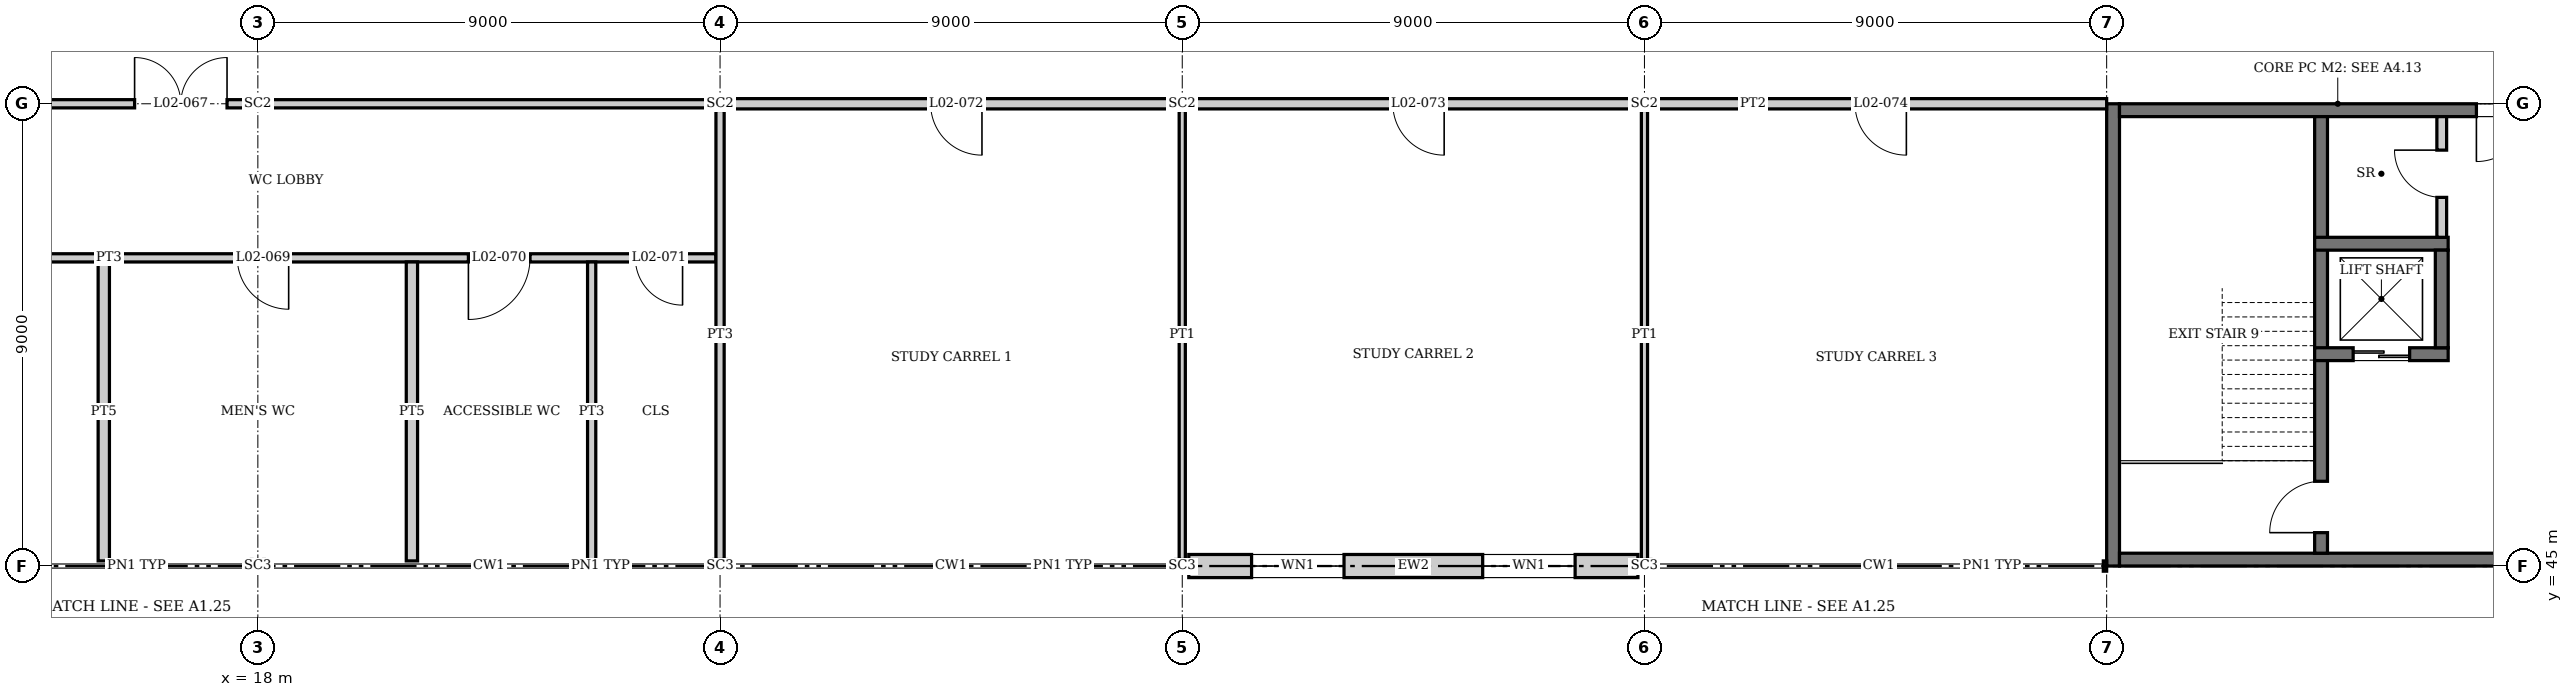
"""IFC4 building model, lengths in metres.
Left out: names, types, materials, properties, quantities, classifications, styles, units other than length and angle.
Written with IfcOpenShell. Run it as: python <this file> out.ifc"""

import sys

from ifc_helpers import new_model, si_unit, direction, frame, frame_2d, origin, origin_2d, place, context, subcontext, project, spatial, rectangle, i_section, extrude, element, fill, save


model = new_model("IFC4")
c1 = context("Model", 3, precision=1e-05, world=origin(), true_north=direction((0.0, 1.0)))
c2 = subcontext(c1, "Body", "Model", "MODEL_VIEW")
j1 = project(units=[si_unit("LENGTHUNIT", "METRE"), si_unit("PLANEANGLEUNIT", "RADIAN")], contexts=[c1])
p1 = place(None, origin())
s1 = spatial("IfcSite", under=j1, at=p1, CompositionType="ELEMENT")
p2 = place(p1, origin())
s2 = spatial("IfcBuilding", under=s1, at=p2, CompositionType="ELEMENT")
p3 = place(p2, frame((0.0, 0.0, 10.5)))
s3 = spatial("IfcBuildingStorey", under=s2, at=p3, CompositionType="ELEMENT", Elevation=10.5)
p4 = place(p3, frame((18.0, 45.0, 0.0), z_axis=(0.0, 0.0, 1.0), x_axis=(0.0, 1.0, 0.0)))
e1 = element("IfcColumn", 1, at=p4, inside=s3, PredefinedType="COLUMN", context=c2, shape_type="SweptSolid", body=[
    extrude(i_section(OverallWidth=0.254, OverallDepth=0.254, WebThickness=0.009, FlangeThickness=0.014, at=origin_2d()), origin(), (0.0, 0.0, 1.0), 4.5),
])
p5 = place(p3, frame((18.0, 54.0, 0.0), z_axis=(0.0, 0.0, 1.0), x_axis=(0.0, 1.0, 0.0)))
e2 = element("IfcColumn", 2, at=p5, inside=s3, PredefinedType="COLUMN", context=c2, shape_type="SweptSolid", body=[
    extrude(i_section(OverallWidth=0.256, OverallDepth=0.26, WebThickness=0.01, FlangeThickness=0.017, at=origin_2d()), origin(), (0.0, 0.0, 1.0), 4.5),
])
p6 = place(p3, frame((27.0, 45.0, 0.0), z_axis=(0.0, 0.0, 1.0), x_axis=(0.0, 1.0, 0.0)))
e3 = element("IfcColumn", 3, at=p6, inside=s3, PredefinedType="COLUMN", context=c2, shape_type="SweptSolid", body=[
    extrude(i_section(OverallWidth=0.254, OverallDepth=0.254, WebThickness=0.009, FlangeThickness=0.014, at=origin_2d()), origin(), (0.0, 0.0, 1.0), 4.5),
])
p7 = place(p3, frame((27.0, 54.0, 0.0), z_axis=(0.0, 0.0, 1.0), x_axis=(0.0, 1.0, 0.0)))
e4 = element("IfcColumn", 4, at=p7, inside=s3, PredefinedType="COLUMN", context=c2, shape_type="SweptSolid", body=[
    extrude(i_section(OverallWidth=0.256, OverallDepth=0.26, WebThickness=0.01, FlangeThickness=0.017, at=origin_2d()), origin(), (0.0, 0.0, 1.0), 4.5),
])
p8 = place(p3, frame((36.0, 45.0, 0.0), z_axis=(0.0, 0.0, 1.0), x_axis=(0.0, 1.0, 0.0)))
e5 = element("IfcColumn", 5, at=p8, inside=s3, PredefinedType="COLUMN", context=c2, shape_type="SweptSolid", body=[
    extrude(i_section(OverallWidth=0.254, OverallDepth=0.254, WebThickness=0.009, FlangeThickness=0.014, at=origin_2d()), origin(), (0.0, 0.0, 1.0), 4.5),
])
p9 = place(p3, frame((36.0, 54.0, 0.0), z_axis=(0.0, 0.0, 1.0), x_axis=(0.0, 1.0, 0.0)))
e6 = element("IfcColumn", 6, at=p9, inside=s3, PredefinedType="COLUMN", context=c2, shape_type="SweptSolid", body=[
    extrude(i_section(OverallWidth=0.256, OverallDepth=0.26, WebThickness=0.01, FlangeThickness=0.017, at=origin_2d()), origin(), (0.0, 0.0, 1.0), 4.5),
])
p10 = place(p3, frame((45.0, 45.0, 0.0), z_axis=(0.0, 0.0, 1.0), x_axis=(0.0, 1.0, 0.0)))
e7 = element("IfcColumn", 7, at=p10, inside=s3, PredefinedType="COLUMN", context=c2, shape_type="SweptSolid", body=[
    extrude(i_section(OverallWidth=0.254, OverallDepth=0.254, WebThickness=0.009, FlangeThickness=0.014, at=origin_2d()), origin(), (0.0, 0.0, 1.0), 4.5),
])
p11 = place(p3, frame((45.0, 54.0, 0.0), z_axis=(0.0, 0.0, 1.0), x_axis=(0.0, 1.0, 0.0)))
e8 = element("IfcColumn", 8, at=p11, inside=s3, PredefinedType="COLUMN", context=c2, shape_type="SweptSolid", body=[
    extrude(i_section(OverallWidth=0.256, OverallDepth=0.26, WebThickness=0.01, FlangeThickness=0.017, at=origin_2d()), origin(), (0.0, 0.0, 1.0), 4.5),
])
p12 = place(p3, frame((54.125, 45.0, 0.0), z_axis=(0.0, 0.0, 1.0), x_axis=(0.0, 1.0, 0.0)))
e9 = element("IfcWall", 9, at=p12, inside=s3, PredefinedType="SHEAR", context=c2, shape_type="SweptSolid", body=[
    extrude(rectangle(XDim=9.0, YDim=0.25, at=frame_2d((4.5, 0.0))), origin(), (0.0, 0.0, 1.0), 4.35),
])
p13 = place(p3, frame((54.25, 45.125, 0.0), z_axis=(0.0, 0.0, 1.0), x_axis=(1.0, 0.0, 0.0)))
e10 = element("IfcWall", 10, at=p13, inside=s3, PredefinedType="SHEAR", context=c2, shape_type="SweptSolid", body=[
    extrude(rectangle(XDim=8.5, YDim=0.25, at=frame_2d((4.25, 0.0))), origin(), (0.0, 0.0, 1.0), 4.35),
])
p14 = place(p3, frame((54.25, 53.875, 0.0), z_axis=(0.0, 0.0, 1.0), x_axis=(1.0, 0.0, 0.0)))
e11 = element("IfcWall", 11, at=p14, inside=s3, PredefinedType="SHEAR", context=c2, shape_type="SweptSolid", body=[
    extrude(rectangle(XDim=8.5, YDim=0.25, at=frame_2d((4.25, 0.0))), origin(), (0.0, 0.0, 1.0), 4.35),
])
p15 = place(p14, frame((6.95, 0.0, 0.0)))
e12 = element("IfcOpeningElement", 12, at=p15, cuts=e11, PredefinedType="OPENING", context=c2, shape_type="SweptSolid", body=[
    extrude(rectangle(XDim=1.0, YDim=2.1, at=frame_2d((0.5, 1.05))), frame((0.0, 0.135, 0.0), z_axis=(0.0, -1.0, 0.0), x_axis=(1.0, 0.0, 0.0)), (0.0, 0.0, 1.0), 0.27),
])
p16 = place(p3, frame((36.127, 45.0, 0.0), z_axis=(0.0, 0.0, 1.0), x_axis=(1.0, 0.0, 0.0)))
e13 = element("IfcWall", 13, at=p16, inside=s3, PredefinedType="SOLIDWALL", context=c2, shape_type="SweptSolid", body=[
    extrude(rectangle(XDim=8.746, YDim=0.45, at=frame_2d((4.373, 0.0))), origin(), (0.0, 0.0, 1.0), 3.991),
])
p17 = place(p16, frame((1.223, 0.0, 0.9)))
e14 = element("IfcOpeningElement", 14, at=p17, cuts=e13, PredefinedType="OPENING", context=c2, shape_type="SweptSolid", body=[
    extrude(rectangle(XDim=1.8, YDim=2.4, at=frame_2d((0.9, 1.2))), frame((0.0, 0.235, 0.0), z_axis=(0.0, -1.0, 0.0), x_axis=(1.0, 0.0, 0.0)), (0.0, 0.0, 1.0), 0.47),
])
p18 = place(p16, frame((5.723, 0.0, 0.9)))
e15 = element("IfcOpeningElement", 15, at=p18, cuts=e13, PredefinedType="OPENING", context=c2, shape_type="SweptSolid", body=[
    extrude(rectangle(XDim=1.8, YDim=2.4, at=frame_2d((0.9, 1.2))), frame((0.0, 0.235, 0.0), z_axis=(0.0, -1.0, 0.0), x_axis=(1.0, 0.0, 0.0)), (0.0, 0.0, 1.0), 0.47),
])
p19 = place(p3, frame((58.175, 45.25, 0.0), z_axis=(0.0, 0.0, 1.0), x_axis=(0.0, 1.0, 0.0)))
e16 = element("IfcWall", 16, at=p19, inside=s3, PredefinedType="SOLIDWALL", context=c2, shape_type="SweptSolid", body=[
    extrude(rectangle(XDim=8.5, YDim=0.25, at=frame_2d((4.25, 0.0))), origin(), (0.0, 0.0, 1.0), 4.35),
])
p20 = place(p19, frame((0.4, 0.0, 0.0)))
e17 = element("IfcOpeningElement", 17, at=p20, cuts=e16, PredefinedType="OPENING", context=c2, shape_type="SweptSolid", body=[
    extrude(rectangle(XDim=1.0, YDim=2.1, at=frame_2d((0.5, 1.05))), frame((0.0, 0.135, 0.0), z_axis=(0.0, -1.0, 0.0), x_axis=(1.0, 0.0, 0.0)), (0.0, 0.0, 1.0), 0.27),
])
p21 = place(p3, frame((58.05, 49.125, 0.0), z_axis=(0.0, 0.0, 1.0), x_axis=(1.0, 0.0, 0.0)))
e18 = element("IfcWall", 18, at=p21, inside=s3, PredefinedType="SOLIDWALL", context=c2, shape_type="SweptSolid", body=[
    extrude(rectangle(XDim=2.6, YDim=0.25, at=frame_2d((1.3, 0.0))), origin(), (0.0, 0.0, 1.0), 4.35),
])
p22 = place(p21, frame((0.75, 0.0, 0.0)))
e19 = element("IfcOpeningElement", 19, at=p22, cuts=e18, PredefinedType="OPENING", context=c2, shape_type="SweptSolid", body=[
    extrude(rectangle(XDim=1.1, YDim=2.1, at=frame_2d((0.55, 1.05))), frame((0.0, 0.135, 0.0), z_axis=(0.0, -1.0, 0.0), x_axis=(1.0, 0.0, 0.0)), (0.0, 0.0, 1.0), 0.27),
])
p23 = place(p3, frame((58.05, 51.275, 0.0), z_axis=(0.0, 0.0, 1.0), x_axis=(1.0, 0.0, 0.0)))
e20 = element("IfcWall", 20, at=p23, inside=s3, PredefinedType="SOLIDWALL", context=c2, shape_type="SweptSolid", body=[
    extrude(rectangle(XDim=2.6, YDim=0.25, at=frame_2d((1.3, 0.0))), origin(), (0.0, 0.0, 1.0), 4.35),
])
p24 = place(p3, frame((60.525, 49.25, 0.0), z_axis=(0.0, 0.0, 1.0), x_axis=(0.0, 1.0, 0.0)))
e21 = element("IfcWall", 21, at=p24, inside=s3, PredefinedType="SOLIDWALL", context=c2, shape_type="SweptSolid", body=[
    extrude(rectangle(XDim=1.9, YDim=0.25, at=frame_2d((0.95, 0.0))), origin(), (0.0, 0.0, 1.0), 4.35),
])
p25 = place(p3, frame((9.0, 51.0, 0.0), z_axis=(0.0, 0.0, 1.0), x_axis=(1.0, 0.0, 0.0)))
e22 = element("IfcWall", 22, at=p25, inside=s3, PredefinedType="PARTITIONING", context=c2, shape_type="SweptSolid", body=[
    extrude(rectangle(XDim=17.92, YDim=0.16, at=frame_2d((8.96, 0.0))), origin(), (0.0, 0.0, 1.0), 3.998),
])
p26 = place(p25, frame((2.6, 0.0, 0.0)))
e23 = element("IfcOpeningElement", 23, at=p26, cuts=e22, PredefinedType="OPENING", context=c2, shape_type="SweptSolid", body=[
    extrude(rectangle(XDim=1.0, YDim=2.1, at=frame_2d((0.5, 1.05))), frame((0.0, 0.09, 0.0), z_axis=(0.0, -1.0, 0.0), x_axis=(1.0, 0.0, 0.0)), (0.0, 0.0, 1.0), 0.18),
])
p27 = place(p25, frame((8.6, 0.0, 0.0)))
e24 = element("IfcOpeningElement", 24, at=p27, cuts=e22, PredefinedType="OPENING", context=c2, shape_type="SweptSolid", body=[
    extrude(rectangle(XDim=1.0, YDim=2.1, at=frame_2d((0.5, 1.05))), frame((0.0, 0.09, 0.0), z_axis=(0.0, -1.0, 0.0), x_axis=(1.0, 0.0, 0.0)), (0.0, 0.0, 1.0), 0.18),
])
p28 = place(p25, frame((13.1, 0.0, 0.0)))
e25 = element("IfcOpeningElement", 25, at=p28, cuts=e22, PredefinedType="OPENING", context=c2, shape_type="SweptSolid", body=[
    extrude(rectangle(XDim=1.2, YDim=2.1, at=frame_2d((0.6, 1.05))), frame((0.0, 0.09, 0.0), z_axis=(0.0, -1.0, 0.0), x_axis=(1.0, 0.0, 0.0)), (0.0, 0.0, 1.0), 0.18),
])
p29 = place(p25, frame((16.35, 0.0, 0.0)))
e26 = element("IfcOpeningElement", 26, at=p29, cuts=e22, PredefinedType="OPENING", context=c2, shape_type="SweptSolid", body=[
    extrude(rectangle(XDim=0.92, YDim=2.1, at=frame_2d((0.46, 1.05))), frame((0.0, 0.09, 0.0), z_axis=(0.0, -1.0, 0.0), x_axis=(1.0, 0.0, 0.0)), (0.0, 0.0, 1.0), 0.18),
])
p30 = place(p3, frame((9.0, 54.0, 0.0), z_axis=(0.0, 0.0, 1.0), x_axis=(1.0, 0.0, 0.0)))
e27 = element("IfcWall", 27, at=p30, inside=s3, PredefinedType="PARTITIONING", context=c2, shape_type="SweptSolid", body=[
    extrude(rectangle(XDim=8.87, YDim=0.16, at=frame_2d((4.435, 0.0))), origin(), (0.0, 0.0, 1.0), 3.738),
])
p31 = place(p30, frame((6.6, 0.0, 0.0)))
e28 = element("IfcOpeningElement", 28, at=p31, cuts=e27, PredefinedType="OPENING", context=c2, shape_type="SweptSolid", body=[
    extrude(rectangle(XDim=1.8, YDim=2.1, at=frame_2d((0.9, 1.05))), frame((0.0, 0.09, 0.0), z_axis=(0.0, -1.0, 0.0), x_axis=(1.0, 0.0, 0.0)), (0.0, 0.0, 1.0), 0.18),
])
p32 = place(p3, frame((18.13, 54.0, 0.0), z_axis=(0.0, 0.0, 1.0), x_axis=(1.0, 0.0, 0.0)))
e29 = element("IfcWall", 29, at=p32, inside=s3, PredefinedType="PARTITIONING", context=c2, shape_type="SweptSolid", body=[
    extrude(rectangle(XDim=8.74, YDim=0.16, at=frame_2d((4.37, 0.0))), origin(), (0.0, 0.0, 1.0), 3.738),
])
p33 = place(p3, frame((27.13, 54.0, 0.0), z_axis=(0.0, 0.0, 1.0), x_axis=(1.0, 0.0, 0.0)))
e30 = element("IfcWall", 30, at=p33, inside=s3, PredefinedType="PARTITIONING", context=c2, shape_type="SweptSolid", body=[
    extrude(rectangle(XDim=8.74, YDim=0.2, at=frame_2d((4.37, 0.0))), origin(), (0.0, 0.0, 1.0), 3.738),
])
p34 = place(p33, frame((3.97, 0.0, 0.0)))
e31 = element("IfcOpeningElement", 31, at=p34, cuts=e30, PredefinedType="OPENING", context=c2, shape_type="SweptSolid", body=[
    extrude(rectangle(XDim=1.0, YDim=2.1, at=frame_2d((0.5, 1.05))), frame((0.0, 0.11, 0.0), z_axis=(0.0, -1.0, 0.0), x_axis=(1.0, 0.0, 0.0)), (0.0, 0.0, 1.0), 0.22),
])
p35 = place(p3, frame((36.13, 54.0, 0.0), z_axis=(0.0, 0.0, 1.0), x_axis=(1.0, 0.0, 0.0)))
e32 = element("IfcWall", 32, at=p35, inside=s3, PredefinedType="PARTITIONING", context=c2, shape_type="SweptSolid", body=[
    extrude(rectangle(XDim=8.74, YDim=0.2, at=frame_2d((4.37, 0.0))), origin(), (0.0, 0.0, 1.0), 3.738),
])
p36 = place(p35, frame((3.97, 0.0, 0.0)))
e33 = element("IfcOpeningElement", 33, at=p36, cuts=e32, PredefinedType="OPENING", context=c2, shape_type="SweptSolid", body=[
    extrude(rectangle(XDim=1.0, YDim=2.1, at=frame_2d((0.5, 1.05))), frame((0.0, 0.11, 0.0), z_axis=(0.0, -1.0, 0.0), x_axis=(1.0, 0.0, 0.0)), (0.0, 0.0, 1.0), 0.22),
])
p37 = place(p3, frame((45.13, 54.0, 0.0), z_axis=(0.0, 0.0, 1.0), x_axis=(1.0, 0.0, 0.0)))
e34 = element("IfcWall", 34, at=p37, inside=s3, PredefinedType="PARTITIONING", context=c2, shape_type="SweptSolid", body=[
    extrude(rectangle(XDim=8.87, YDim=0.2, at=frame_2d((4.435, 0.0))), origin(), (0.0, 0.0, 1.0), 3.738),
])
p38 = place(p37, frame((3.97, 0.0, 0.0)))
e35 = element("IfcOpeningElement", 35, at=p38, cuts=e34, PredefinedType="OPENING", context=c2, shape_type="SweptSolid", body=[
    extrude(rectangle(XDim=1.0, YDim=2.1, at=frame_2d((0.5, 1.05))), frame((0.0, 0.11, 0.0), z_axis=(0.0, -1.0, 0.0), x_axis=(1.0, 0.0, 0.0)), (0.0, 0.0, 1.0), 0.22),
])
for number, where, z_axis, x_axis in (
    (36, (15.0, 45.1, 0.0), (0.0, 0.0, 1.0), (0.0, 1.0, 0.0)),
    (37, (21.0, 45.1, 0.0), (0.0, 0.0, 1.0), (0.0, 1.0, 0.0)),
):
    element("IfcWall", number, at=place(p3, frame(where, z_axis=z_axis, x_axis=x_axis)), inside=s3, PredefinedType="PLUMBINGWALL", context=c2, shape_type="SweptSolid", body=[
        extrude(rectangle(XDim=5.82, YDim=0.22, at=frame_2d((2.91, 0.0))), origin(), (0.0, 0.0, 1.0), 4.35),
    ])
p39 = place(p3, frame((24.5, 45.1, 0.0), z_axis=(0.0, 0.0, 1.0), x_axis=(0.0, 1.0, 0.0)))
e38 = element("IfcWall", 38, at=p39, inside=s3, PredefinedType="PARTITIONING", context=c2, shape_type="SweptSolid", body=[
    extrude(rectangle(XDim=5.82, YDim=0.16, at=frame_2d((2.91, 0.0))), origin(), (0.0, 0.0, 1.0), 4.35),
])
p40 = place(p3, frame((27.0, 45.127, 0.0), z_axis=(0.0, 0.0, 1.0), x_axis=(0.0, 1.0, 0.0)))
e39 = element("IfcWall", 39, at=p40, inside=s3, PredefinedType="PARTITIONING", context=c2, shape_type="SweptSolid", body=[
    extrude(rectangle(XDim=8.743, YDim=0.16, at=frame_2d((4.372, 0.0))), origin(), (0.0, 0.0, 1.0), 3.998),
])
for number, where, z_axis, x_axis in (
    (40, (36.0, 45.127, 0.0), (0.0, 0.0, 1.0), (0.0, 1.0, 0.0)),
    (41, (45.0, 45.127, 0.0), (0.0, 0.0, 1.0), (0.0, 1.0, 0.0)),
):
    element("IfcWall", number, at=place(p3, frame(where, z_axis=z_axis, x_axis=x_axis)), inside=s3, PredefinedType="PARTITIONING", context=c2, shape_type="SweptSolid", body=[
        extrude(rectangle(XDim=8.743, YDim=0.12, at=frame_2d((4.372, 0.0))), origin(), (0.0, 0.0, 1.0), 3.998),
    ])
p41 = place(p3, frame((60.525, 51.4, 0.0), z_axis=(0.0, 0.0, 1.0), x_axis=(0.0, 1.0, 0.0)))
e42 = element("IfcWall", 42, at=p41, inside=s3, PredefinedType="PARTITIONING", context=c2, shape_type="SweptSolid", body=[
    extrude(rectangle(XDim=2.35, YDim=0.19, at=frame_2d((1.175, 0.0))), origin(), (0.0, 0.0, 1.0), 4.35),
])
p42 = place(p41, frame((0.778, 0.0, 0.0)))
e43 = element("IfcOpeningElement", 43, at=p42, cuts=e42, PredefinedType="OPENING", context=c2, shape_type="SweptSolid", body=[
    extrude(rectangle(XDim=0.92, YDim=2.1, at=frame_2d((0.46, 1.05))), frame((0.0, 0.105, 0.0), z_axis=(0.0, -1.0, 0.0), x_axis=(1.0, 0.0, 0.0)), (0.0, 0.0, 1.0), 0.21),
])
p43 = place(p17, origin())
e44 = element("IfcWindow", 44, at=p43, inside=s3, PartitioningType="SINGLE_PANEL", PredefinedType="WINDOW", context=c2, shape_type="SweptSolid", body=[
    extrude(rectangle(XDim=1.8, YDim=2.4, at=frame_2d((0.9, 1.2))), frame((0.0, 0.03, 0.0), z_axis=(0.0, -1.0, 0.0), x_axis=(1.0, 0.0, 0.0)), (0.0, 0.0, 1.0), 0.06),
])
fill(e14, e44)
p44 = place(p18, origin())
e45 = element("IfcWindow", 45, at=p44, inside=s3, PartitioningType="SINGLE_PANEL", PredefinedType="WINDOW", context=c2, shape_type="SweptSolid", body=[
    extrude(rectangle(XDim=1.8, YDim=2.4, at=frame_2d((0.9, 1.2))), frame((0.0, 0.03, 0.0), z_axis=(0.0, -1.0, 0.0), x_axis=(1.0, 0.0, 0.0)), (0.0, 0.0, 1.0), 0.06),
])
fill(e15, e45)
p45 = place(p22, origin())
e46 = element("IfcDoor", 46, at=p45, inside=s3, OperationType="DOUBLE_DOOR_SLIDING", PredefinedType="DOOR", context=c2, shape_type="SweptSolid", body=[
    extrude(rectangle(XDim=1.1, YDim=2.1, at=frame_2d((0.55, 1.05))), frame((0.0, 0.025, 0.0), z_axis=(0.0, -1.0, 0.0), x_axis=(1.0, 0.0, 0.0)), (0.0, 0.0, 1.0), 0.05),
])
fill(e19, e46)
p46 = place(p20, origin())
e47 = element("IfcDoor", 47, at=p46, inside=s3, OperationType="SINGLE_SWING_LEFT", PredefinedType="DOOR", context=c2, shape_type="SweptSolid", body=[
    extrude(rectangle(XDim=1.0, YDim=2.1, at=frame_2d((0.5, 1.05))), frame((0.0, 0.025, 0.0), z_axis=(0.0, -1.0, 0.0), x_axis=(1.0, 0.0, 0.0)), (0.0, 0.0, 1.0), 0.05),
])
fill(e17, e47)
p47 = place(p15, frame((1.0, 0.0, 0.0), z_axis=(0.0, 0.0, 1.0), x_axis=(-1.0, 0.0, 0.0)))
e48 = element("IfcDoor", 48, at=p47, inside=s3, OperationType="SINGLE_SWING_RIGHT", PredefinedType="DOOR", context=c2, shape_type="SweptSolid", body=[
    extrude(rectangle(XDim=1.0, YDim=2.1, at=frame_2d((0.5, 1.05))), frame((0.0, 0.025, 0.0), z_axis=(0.0, -1.0, 0.0), x_axis=(1.0, 0.0, 0.0)), (0.0, 0.0, 1.0), 0.05),
])
fill(e12, e48)
p48 = place(p42, origin())
e49 = element("IfcDoor", 49, at=p48, inside=s3, OperationType="SINGLE_SWING_RIGHT", PredefinedType="DOOR", context=c2, shape_type="SweptSolid", body=[
    extrude(rectangle(XDim=0.92, YDim=2.1, at=frame_2d((0.46, 1.05))), frame((0.0, 0.025, 0.0), z_axis=(0.0, -1.0, 0.0), x_axis=(1.0, 0.0, 0.0)), (0.0, 0.0, 1.0), 0.05),
])
fill(e43, e49)
p49 = place(p31, origin())
e50 = element("IfcDoor", 50, at=p49, inside=s3, OperationType="DOUBLE_DOOR_SINGLE_SWING", PredefinedType="DOOR", context=c2, shape_type="SweptSolid", body=[
    extrude(rectangle(XDim=1.8, YDim=2.1, at=frame_2d((0.9, 1.05))), frame((0.0, 0.025, 0.0), z_axis=(0.0, -1.0, 0.0), x_axis=(1.0, 0.0, 0.0)), (0.0, 0.0, 1.0), 0.05),
])
fill(e28, e50)
p50 = place(p27, frame((1.0, 0.0, 0.0), z_axis=(0.0, 0.0, 1.0), x_axis=(-1.0, 0.0, 0.0)))
e51 = element("IfcDoor", 51, at=p50, inside=s3, OperationType="SINGLE_SWING_LEFT", PredefinedType="DOOR", context=c2, shape_type="SweptSolid", body=[
    extrude(rectangle(XDim=1.0, YDim=2.1, at=frame_2d((0.5, 1.05))), frame((0.0, 0.025, 0.0), z_axis=(0.0, -1.0, 0.0), x_axis=(1.0, 0.0, 0.0)), (0.0, 0.0, 1.0), 0.05),
])
fill(e24, e51)
p51 = place(p28, frame((1.2, 0.0, 0.0), z_axis=(0.0, 0.0, 1.0), x_axis=(-1.0, 0.0, 0.0)))
e52 = element("IfcDoor", 52, at=p51, inside=s3, OperationType="SINGLE_SWING_RIGHT", PredefinedType="DOOR", context=c2, shape_type="SweptSolid", body=[
    extrude(rectangle(XDim=1.2, YDim=2.1, at=frame_2d((0.6, 1.05))), frame((0.0, 0.025, 0.0), z_axis=(0.0, -1.0, 0.0), x_axis=(1.0, 0.0, 0.0)), (0.0, 0.0, 1.0), 0.05),
])
fill(e25, e52)
p52 = place(p29, frame((0.92, 0.0, 0.0), z_axis=(0.0, 0.0, 1.0), x_axis=(-1.0, 0.0, 0.0)))
e53 = element("IfcDoor", 53, at=p52, inside=s3, OperationType="SINGLE_SWING_LEFT", PredefinedType="DOOR", context=c2, shape_type="SweptSolid", body=[
    extrude(rectangle(XDim=0.92, YDim=2.1, at=frame_2d((0.46, 1.05))), frame((0.0, 0.025, 0.0), z_axis=(0.0, -1.0, 0.0), x_axis=(1.0, 0.0, 0.0)), (0.0, 0.0, 1.0), 0.05),
])
fill(e26, e53)
p53 = place(p34, frame((1.0, 0.0, 0.0), z_axis=(0.0, 0.0, 1.0), x_axis=(-1.0, 0.0, 0.0)))
e54 = element("IfcDoor", 54, at=p53, inside=s3, OperationType="SINGLE_SWING_LEFT", PredefinedType="DOOR", context=c2, shape_type="SweptSolid", body=[
    extrude(rectangle(XDim=1.0, YDim=2.1, at=frame_2d((0.5, 1.05))), frame((0.0, 0.025, 0.0), z_axis=(0.0, -1.0, 0.0), x_axis=(1.0, 0.0, 0.0)), (0.0, 0.0, 1.0), 0.05),
])
fill(e31, e54)
p54 = place(p36, frame((1.0, 0.0, 0.0), z_axis=(0.0, 0.0, 1.0), x_axis=(-1.0, 0.0, 0.0)))
e55 = element("IfcDoor", 55, at=p54, inside=s3, OperationType="SINGLE_SWING_LEFT", PredefinedType="DOOR", context=c2, shape_type="SweptSolid", body=[
    extrude(rectangle(XDim=1.0, YDim=2.1, at=frame_2d((0.5, 1.05))), frame((0.0, 0.025, 0.0), z_axis=(0.0, -1.0, 0.0), x_axis=(1.0, 0.0, 0.0)), (0.0, 0.0, 1.0), 0.05),
])
fill(e33, e55)
p55 = place(p38, frame((1.0, 0.0, 0.0), z_axis=(0.0, 0.0, 1.0), x_axis=(-1.0, 0.0, 0.0)))
e56 = element("IfcDoor", 56, at=p55, inside=s3, OperationType="SINGLE_SWING_LEFT", PredefinedType="DOOR", context=c2, shape_type="SweptSolid", body=[
    extrude(rectangle(XDim=1.0, YDim=2.1, at=frame_2d((0.5, 1.05))), frame((0.0, 0.025, 0.0), z_axis=(0.0, -1.0, 0.0), x_axis=(1.0, 0.0, 0.0)), (0.0, 0.0, 1.0), 0.05),
])
fill(e35, e56)
save(model, sys.argv[1])
